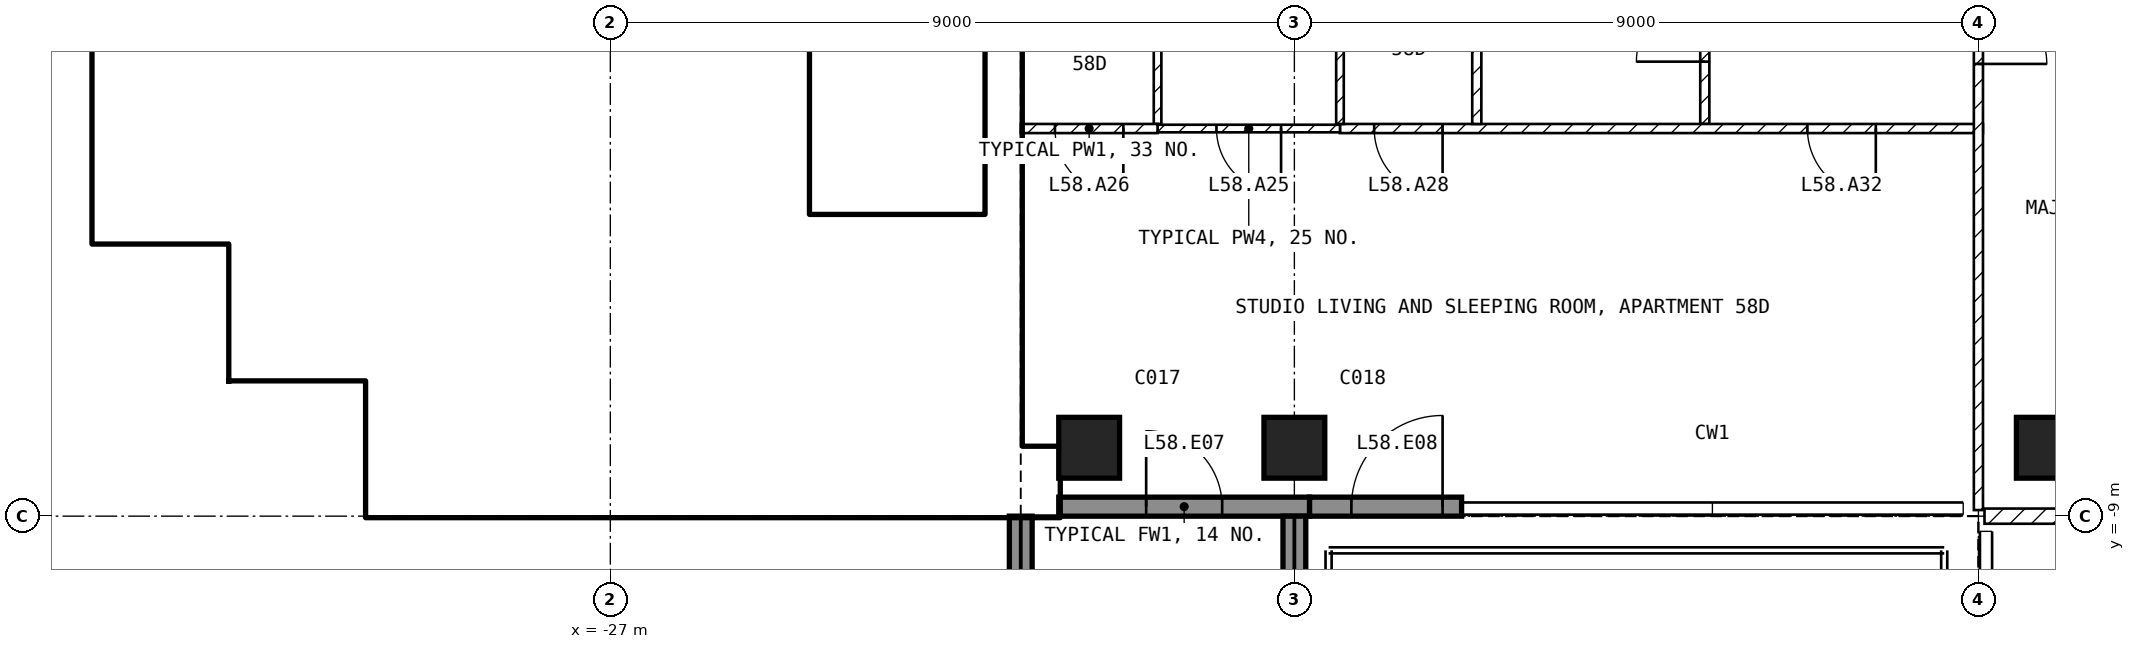
"""IFC4 building model, lengths in metres.
Left out: names, types, materials, properties, quantities, classifications, styles, units other than length and angle.
Written with IfcOpenShell. Run it as: python <this file> out.ifc"""

import sys

from ifc_helpers import new_model, si_unit, direction, frame, frame_2d, origin, origin_2d, place, context, subcontext, project, spatial, rectangle, extrude, element, fill, save


model = new_model("IFC4")
c1 = context("Model", 3, precision=1e-05, world=origin(), true_north=direction((0.0, 1.0)))
c2 = subcontext(c1, "Body", "Model", "MODEL_VIEW")
j1 = project(units=[si_unit("LENGTHUNIT", "METRE"), si_unit("PLANEANGLEUNIT", "RADIAN")], contexts=[c1])
p1 = place(None, origin())
s1 = spatial("IfcSite", under=j1, at=p1, CompositionType="ELEMENT")
p2 = place(p1, origin())
s2 = spatial("IfcBuilding", under=s1, at=p2, CompositionType="ELEMENT")
p3 = place(p2, frame((0.0, 0.0, 232.5)))
s3 = spatial("IfcBuildingStorey", under=s2, at=p3, CompositionType="ELEMENT", Elevation=232.5)
for number, where, z_axis, x_axis in (
    (1, (-20.7, -8.1, -0.25), (0.0, 0.0, 1.0), (1.0, 0.0, 0.0)),
    (2, (-18.0, -8.1, -0.25), (0.0, 0.0, 1.0), (1.0, 0.0, 0.0)),
    (3, (-8.1, -8.1, -0.25), (0.0, 0.0, 1.0), (1.0, 0.0, 0.0)),
):
    element("IfcColumn", number, at=place(p3, frame(where, z_axis=z_axis, x_axis=x_axis)), inside=s3, PredefinedType="COLUMN", context=c2, shape_type="SweptSolid", body=[
        extrude(rectangle(XDim=0.8, YDim=0.8, at=origin_2d()), origin(), (0.0, 0.0, 1.0), 3.5),
    ])
p4 = place(p3, frame((-21.1, -8.875, 0.0), z_axis=(0.0, 0.0, 1.0), x_axis=(1.0, 0.0, 0.0)))
e4 = element("IfcWall", 4, at=p4, inside=s3, PredefinedType="SOLIDWALL", context=c2, shape_type="SweptSolid", body=[
    extrude(rectangle(XDim=3.3, YDim=0.25, at=frame_2d((1.65, 0.0))), origin(), (0.0, 0.0, 1.0), 3.25),
])
p5 = place(p4, frame((1.15, 0.0, 0.0)))
e5 = element("IfcOpeningElement", 5, at=p5, cuts=e4, PredefinedType="OPENING", context=c2, shape_type="SweptSolid", body=[
    extrude(rectangle(XDim=1.0, YDim=2.4, at=frame_2d((0.5, 1.2))), frame((0.0, 0.135, 0.0), z_axis=(0.0, -1.0, 0.0), x_axis=(1.0, 0.0, 0.0)), (0.0, 0.0, 1.0), 0.27),
])
p6 = place(p3, frame((-17.8, -8.875, 0.0), z_axis=(0.0, 0.0, 1.0), x_axis=(1.0, 0.0, 0.0)))
e6 = element("IfcWall", 6, at=p6, inside=s3, PredefinedType="SOLIDWALL", context=c2, shape_type="SweptSolid", body=[
    extrude(rectangle(XDim=2.0, YDim=0.25, at=frame_2d((1.0, 0.0))), origin(), (0.0, 0.0, 1.0), 3.25),
])
p7 = place(p6, frame((0.55, 0.0, 0.0)))
e7 = element("IfcOpeningElement", 7, at=p7, cuts=e6, PredefinedType="OPENING", context=c2, shape_type="SweptSolid", body=[
    extrude(rectangle(XDim=1.2, YDim=2.4, at=frame_2d((0.6, 1.2))), frame((0.0, 0.135, 0.0), z_axis=(0.0, -1.0, 0.0), x_axis=(1.0, 0.0, 0.0)), (0.0, 0.0, 1.0), 0.27),
])
p8 = place(p3, frame((-21.6, -9.0, 0.0), z_axis=(0.0, 0.0, 1.0), x_axis=(0.0, -1.0, 0.0)))
e8 = element("IfcWall", 8, at=p8, inside=s3, PredefinedType="SOLIDWALL", context=c2, shape_type="SweptSolid", body=[
    extrude(rectangle(XDim=2.7, YDim=0.3, at=frame_2d((1.35, 0.0))), origin(), (0.0, 0.0, 1.0), 3.25),
])
p9 = place(p3, frame((-18.0, -9.0, 0.0), z_axis=(0.0, 0.0, 1.0), x_axis=(0.0, -1.0, 0.0)))
e9 = element("IfcWall", 9, at=p9, inside=s3, PredefinedType="SOLIDWALL", context=c2, shape_type="SweptSolid", body=[
    extrude(rectangle(XDim=2.74, YDim=0.3, at=frame_2d((1.37, 0.0))), origin(), (0.0, 0.0, 1.0), 3.25),
])
p10 = place(p3, frame((-30.2, -8.55, 0.0), z_axis=(0.0, 0.0, 1.0), x_axis=(1.0, 0.0, 0.0)))
e10 = element("IfcWall", 10, at=p10, inside=s3, PredefinedType="SHEAR", context=c2, shape_type="SweptSolid", body=[
    extrude(rectangle(XDim=9.1, YDim=0.9, at=frame_2d((4.55, 0.0))), origin(), (0.0, 0.0, 1.0), 3.25),
])
p11 = place(p3, frame((-29.975, -8.1, 0.0), z_axis=(0.0, 0.0, 1.0), x_axis=(0.0, 1.0, 0.0)))
e11 = element("IfcWall", 11, at=p11, inside=s3, PredefinedType="SHEAR", context=c2, shape_type="SweptSolid", body=[
    extrude(rectangle(XDim=1.35, YDim=0.45, at=frame_2d((0.675, 0.0))), origin(), (0.0, 0.0, 1.0), 3.25),
])
for number, where, z_axis, x_axis in (
    (12, (-32.0, -6.975, 0.0), (0.0, 0.0, 1.0), (1.0, 0.0, 0.0)),
    (13, (-31.775, -6.75, 0.0), (0.0, 0.0, 1.0), (0.0, 1.0, 0.0)),
    (14, (-33.8, -5.175, 0.0), (0.0, 0.0, 1.0), (1.0, 0.0, 0.0)),
):
    element("IfcWall", number, at=place(p3, frame(where, z_axis=z_axis, x_axis=x_axis)), inside=s3, PredefinedType="SHEAR", context=c2, shape_type="SweptSolid", body=[
        extrude(rectangle(XDim=1.8, YDim=0.45, at=frame_2d((0.9, 0.0))), origin(), (0.0, 0.0, 1.0), 3.25),
    ])
p12 = place(p3, frame((-33.575, -4.95, 0.0), z_axis=(0.0, 0.0, 1.0), x_axis=(0.0, 1.0, 0.0)))
e15 = element("IfcWall", 15, at=p12, inside=s3, PredefinedType="SHEAR", context=c2, shape_type="SweptSolid", body=[
    extrude(rectangle(XDim=10.35, YDim=0.45, at=frame_2d((5.175, 0.0))), origin(), (0.0, 0.0, 1.0), 3.25),
])
p13 = place(p3, frame((-21.825, -8.1, 0.0), z_axis=(0.0, 0.0, 1.0), x_axis=(0.0, 1.0, 0.0)))
e16 = element("IfcWall", 16, at=p13, inside=s3, PredefinedType="SHEAR", context=c2, shape_type="SweptSolid", body=[
    extrude(rectangle(XDim=6.9, YDim=0.45, at=frame_2d((3.45, 0.0))), origin(), (0.0, 0.0, 1.0), 3.25),
])
p14 = place(p3, frame((-24.5, -5.05, 0.0), z_axis=(0.0, 0.0, 1.0), x_axis=(0.0, 1.0, 0.0)))
e17 = element("IfcWall", 17, at=p14, inside=s3, PredefinedType="SOLIDWALL", context=c2, shape_type="SweptSolid", body=[
    extrude(rectangle(XDim=3.7, YDim=0.2, at=frame_2d((1.85, 0.0))), origin(), (0.0, 0.0, 1.0), 3.25),
])
p15 = place(p14, frame((0.1, 0.0, 0.0)))
e18 = element("IfcOpeningElement", 18, at=p15, cuts=e17, PredefinedType="OPENING", context=c2, shape_type="SweptSolid", body=[
    extrude(rectangle(XDim=0.8, YDim=2.1, at=frame_2d((0.4, 1.05))), frame((0.0, 0.11, 0.0), z_axis=(0.0, -1.0, 0.0), x_axis=(1.0, 0.0, 0.0)), (0.0, 0.0, 1.0), 0.22),
])
p16 = place(p3, frame((-28.35, -5.15, 0.0), z_axis=(0.0, 0.0, 1.0), x_axis=(1.0, 0.0, 0.0)))
e19 = element("IfcWall", 19, at=p16, inside=s3, PredefinedType="SOLIDWALL", context=c2, shape_type="SweptSolid", body=[
    extrude(rectangle(XDim=6.3, YDim=0.2, at=frame_2d((3.15, 0.0))), origin(), (0.0, 0.0, 1.0), 3.25),
])
p17 = place(p16, frame((5.1, 0.0, 0.0)))
e20 = element("IfcOpeningElement", 20, at=p17, cuts=e19, PredefinedType="OPENING", context=c2, shape_type="SweptSolid", body=[
    extrude(rectangle(XDim=1.0, YDim=2.1, at=frame_2d((0.5, 1.05))), frame((0.0, 0.11, 0.0), z_axis=(0.0, -1.0, 0.0), x_axis=(1.0, 0.0, 0.0)), (0.0, 0.0, 1.0), 0.22),
])
p18 = place(p3, frame((-28.25, -8.1, 0.0), z_axis=(0.0, 0.0, 1.0), x_axis=(0.0, 1.0, 0.0)))
e21 = element("IfcWall", 21, at=p18, inside=s3, PredefinedType="SOLIDWALL", context=c2, shape_type="SweptSolid", body=[
    extrude(rectangle(XDim=2.85, YDim=0.2, at=frame_2d((1.425, 0.0))), origin(), (0.0, 0.0, 1.0), 3.25),
])
p19 = place(p3, frame((-33.35, -3.95, 0.0), z_axis=(0.0, 0.0, 1.0), x_axis=(1.0, 0.0, 0.0)))
e22 = element("IfcWall", 22, at=p19, inside=s3, PredefinedType="SOLIDWALL", context=c2, shape_type="SweptSolid", body=[
    extrude(rectangle(XDim=8.75, YDim=0.2, at=frame_2d((4.375, 0.0))), origin(), (0.0, 0.0, 1.0), 3.25),
])
for number, where, z_axis, x_axis in (
    (23, (-26.5, -3.85, 0.0), (0.0, 0.0, 1.0), (0.0, 1.0, 0.0)),
    (24, (-28.5, -3.85, 0.0), (0.0, 0.0, 1.0), (0.0, 1.0, 0.0)),
    (25, (-30.5, -3.85, 0.0), (0.0, 0.0, 1.0), (0.0, 1.0, 0.0)),
):
    element("IfcWall", number, at=place(p3, frame(where, z_axis=z_axis, x_axis=x_axis)), inside=s3, PredefinedType="SOLIDWALL", context=c2, shape_type="SweptSolid", body=[
        extrude(rectangle(XDim=2.3, YDim=0.2, at=frame_2d((1.15, 0.0))), origin(), (0.0, 0.0, 1.0), 3.25),
    ])
p20 = place(p3, frame((8.92, -9.0, 0.0), z_axis=(0.0, 0.0, 1.0), x_axis=(-1.0, 0.0, 0.0)))
e26 = element("IfcWall", 26, at=p20, inside=s3, PredefinedType="PARTITIONING", context=c2, shape_type="SweptSolid", body=[
    extrude(rectangle(XDim=17.84, YDim=0.2, at=frame_2d((8.92, 0.0))), origin(), (0.0, 0.0, 1.0), 3.25),
])
p21 = place(p20, frame((8.42, 0.0, 0.0)))
e27 = element("IfcOpeningElement", 27, at=p21, cuts=e26, PredefinedType="OPENING", context=c2, shape_type="SweptSolid", body=[
    extrude(rectangle(XDim=1.0, YDim=2.1, at=frame_2d((0.5, 1.05))), frame((0.0, 0.11, 0.0), z_axis=(0.0, -1.0, 0.0), x_axis=(1.0, 0.0, 0.0)), (0.0, 0.0, 1.0), 0.22),
])
p22 = place(p3, frame((-12.6, -3.84, 0.0), z_axis=(0.0, 0.0, 1.0), x_axis=(0.0, 1.0, 0.0)))
e28 = element("IfcWall", 28, at=p22, inside=s3, PredefinedType="PARTITIONING", context=c2, shape_type="SweptSolid", body=[
    extrude(rectangle(XDim=2.54, YDim=0.12, at=frame_2d((1.27, 0.0))), origin(), (0.0, 0.0, 1.0), 3.25),
])
p23 = place(p22, frame((0.82, 0.0, 0.0)))
e29 = element("IfcOpeningElement", 29, at=p23, cuts=e28, PredefinedType="OPENING", context=c2, shape_type="SweptSolid", body=[
    extrude(rectangle(XDim=0.9, YDim=2.1, at=frame_2d((0.45, 1.05))), frame((0.0, 0.07, 0.0), z_axis=(0.0, -1.0, 0.0), x_axis=(1.0, 0.0, 0.0)), (0.0, 0.0, 1.0), 0.14),
])
p24 = place(p3, frame((-8.94, -3.9, 0.0), z_axis=(0.0, 0.0, 1.0), x_axis=(-1.0, 0.0, 0.0)))
e30 = element("IfcWall", 30, at=p24, inside=s3, PredefinedType="PARTITIONING", context=c2, shape_type="SweptSolid", body=[
    extrude(rectangle(XDim=8.46, YDim=0.12, at=frame_2d((4.23, 0.0))), origin(), (0.0, 0.0, 1.0), 3.25),
])
p25 = place(p24, frame((7.11, 0.0, 0.0)))
e31 = element("IfcOpeningElement", 31, at=p25, cuts=e30, PredefinedType="OPENING", context=c2, shape_type="SweptSolid", body=[
    extrude(rectangle(XDim=0.9, YDim=2.1, at=frame_2d((0.45, 1.05))), frame((0.0, 0.07, 0.0), z_axis=(0.0, -1.0, 0.0), x_axis=(1.0, 0.0, 0.0)), (0.0, 0.0, 1.0), 0.14),
])
p26 = place(p24, frame((1.41, 0.0, 0.0)))
e32 = element("IfcOpeningElement", 32, at=p26, cuts=e30, PredefinedType="OPENING", context=c2, shape_type="SweptSolid", body=[
    extrude(rectangle(XDim=0.9, YDim=2.1, at=frame_2d((0.45, 1.05))), frame((0.0, 0.07, 0.0), z_axis=(0.0, -1.0, 0.0), x_axis=(1.0, 0.0, 0.0)), (0.0, 0.0, 1.0), 0.14),
])
p27 = place(p3, frame((-9.0, -1.3, 0.0), z_axis=(0.0, 0.0, 1.0), x_axis=(0.0, -1.0, 0.0)))
e33 = element("IfcWall", 33, at=p27, inside=s3, PredefinedType="PARTITIONING", context=c2, shape_type="SweptSolid", body=[
    extrude(rectangle(XDim=7.62, YDim=0.12, at=frame_2d((3.81, 0.0))), origin(), (0.0, 0.0, 1.0), 3.25),
])
p28 = place(p27, frame((0.85, 0.0, 0.0)))
e34 = element("IfcOpeningElement", 34, at=p28, cuts=e33, PredefinedType="OPENING", context=c2, shape_type="SweptSolid", body=[
    extrude(rectangle(XDim=0.9, YDim=2.1, at=frame_2d((0.45, 1.05))), frame((0.0, 0.07, 0.0), z_axis=(0.0, -1.0, 0.0), x_axis=(1.0, 0.0, 0.0)), (0.0, 0.0, 1.0), 0.14),
])
p29 = place(p3, frame((-15.6, -3.84, 0.0), z_axis=(0.0, 0.0, 1.0), x_axis=(0.0, 1.0, 0.0)))
e35 = element("IfcWall", 35, at=p29, inside=s3, PredefinedType="PARTITIONING", context=c2, shape_type="SweptSolid", body=[
    extrude(rectangle(XDim=2.54, YDim=0.12, at=frame_2d((1.27, 0.0))), origin(), (0.0, 0.0, 1.0), 3.25),
])
for number, where, z_axis, x_axis in (
    (36, (-17.4, -3.84, 0.0), (0.0, 0.0, 1.0), (0.0, 1.0, 0.0)),
    (37, (-19.8, -3.84, 0.0), (0.0, 0.0, 1.0), (0.0, 1.0, 0.0)),
):
    element("IfcWall", number, at=place(p3, frame(where, z_axis=z_axis, x_axis=x_axis)), inside=s3, PredefinedType="PARTITIONING", context=c2, shape_type="SweptSolid", body=[
        extrude(rectangle(XDim=2.54, YDim=0.1, at=frame_2d((1.27, 0.0))), origin(), (0.0, 0.0, 1.0), 3.25),
    ])
p30 = place(p3, frame((-17.4, -3.9, 0.0), z_axis=(0.0, 0.0, 1.0), x_axis=(-1.0, 0.0, 0.0)))
e38 = element("IfcWall", 38, at=p30, inside=s3, PredefinedType="PARTITIONING", context=c2, shape_type="SweptSolid", body=[
    extrude(rectangle(XDim=2.4, YDim=0.1, at=frame_2d((1.2, 0.0))), origin(), (0.0, 0.0, 1.0), 3.25),
])
p31 = place(p30, frame((0.775, 0.0, 0.0)))
e39 = element("IfcOpeningElement", 39, at=p31, cuts=e38, PredefinedType="OPENING", context=c2, shape_type="SweptSolid", body=[
    extrude(rectangle(XDim=0.85, YDim=2.1, at=frame_2d((0.425, 1.05))), frame((0.0, 0.06, 0.0), z_axis=(0.0, -1.0, 0.0), x_axis=(1.0, 0.0, 0.0)), (0.0, 0.0, 1.0), 0.12),
])
p32 = place(p3, frame((-19.8, -3.9, 0.0), z_axis=(0.0, 0.0, 1.0), x_axis=(-1.0, 0.0, 0.0)))
e40 = element("IfcWall", 40, at=p32, inside=s3, PredefinedType="PARTITIONING", context=c2, shape_type="SweptSolid", body=[
    extrude(rectangle(XDim=1.8, YDim=0.12, at=frame_2d((0.9, 0.0))), origin(), (0.0, 0.0, 1.0), 3.25),
])
p33 = place(p32, frame((0.45, 0.0, 0.0)))
e41 = element("IfcOpeningElement", 41, at=p33, cuts=e40, PredefinedType="OPENING", context=c2, shape_type="SweptSolid", body=[
    extrude(rectangle(XDim=0.9, YDim=2.1, at=frame_2d((0.45, 1.05))), frame((0.0, 0.07, 0.0), z_axis=(0.0, -1.0, 0.0), x_axis=(1.0, 0.0, 0.0)), (0.0, 0.0, 1.0), 0.14),
])
p34 = place(p5, origin())
e42 = element("IfcDoor", 42, at=p34, inside=s3, OperationType="SINGLE_SWING_LEFT", PredefinedType="DOOR", context=c2, shape_type="SweptSolid", body=[
    extrude(rectangle(XDim=1.0, YDim=2.4, at=frame_2d((0.5, 1.2))), frame((0.0, 0.025, 0.0), z_axis=(0.0, -1.0, 0.0), x_axis=(1.0, 0.0, 0.0)), (0.0, 0.0, 1.0), 0.05),
])
fill(e5, e42)
p35 = place(p7, origin())
e43 = element("IfcDoor", 43, at=p35, inside=s3, OperationType="SINGLE_SWING_RIGHT", PredefinedType="DOOR", context=c2, shape_type="SweptSolid", body=[
    extrude(rectangle(XDim=1.2, YDim=2.4, at=frame_2d((0.6, 1.2))), frame((0.0, 0.025, 0.0), z_axis=(0.0, -1.0, 0.0), x_axis=(1.0, 0.0, 0.0)), (0.0, 0.0, 1.0), 0.05),
])
fill(e7, e43)
p36 = place(p17, origin())
e44 = element("IfcDoor", 44, at=p36, inside=s3, OperationType="SINGLE_SWING_LEFT", PredefinedType="DOOR", context=c2, shape_type="SweptSolid", body=[
    extrude(rectangle(XDim=1.0, YDim=2.1, at=frame_2d((0.5, 1.05))), frame((0.0, 0.025, 0.0), z_axis=(0.0, -1.0, 0.0), x_axis=(1.0, 0.0, 0.0)), (0.0, 0.0, 1.0), 0.05),
])
fill(e20, e44)
p37 = place(p15, origin())
e45 = element("IfcDoor", 45, at=p37, inside=s3, OperationType="SINGLE_SWING_LEFT", PredefinedType="DOOR", context=c2, shape_type="SweptSolid", body=[
    extrude(rectangle(XDim=0.8, YDim=2.1, at=frame_2d((0.4, 1.05))), frame((0.0, 0.025, 0.0), z_axis=(0.0, -1.0, 0.0), x_axis=(1.0, 0.0, 0.0)), (0.0, 0.0, 1.0), 0.05),
])
fill(e18, e45)
p38 = place(p31, origin())
e46 = element("IfcDoor", 46, at=p38, inside=s3, OperationType="SINGLE_SWING_LEFT", PredefinedType="DOOR", context=c2, shape_type="SweptSolid", body=[
    extrude(rectangle(XDim=0.85, YDim=2.1, at=frame_2d((0.425, 1.05))), frame((0.0, 0.025, 0.0), z_axis=(0.0, -1.0, 0.0), x_axis=(1.0, 0.0, 0.0)), (0.0, 0.0, 1.0), 0.05),
])
fill(e39, e46)
p39 = place(p33, origin())
e47 = element("IfcDoor", 47, at=p39, inside=s3, OperationType="SINGLE_SWING_LEFT", PredefinedType="DOOR", context=c2, shape_type="SweptSolid", body=[
    extrude(rectangle(XDim=0.9, YDim=2.1, at=frame_2d((0.45, 1.05))), frame((0.0, 0.025, 0.0), z_axis=(0.0, -1.0, 0.0), x_axis=(1.0, 0.0, 0.0)), (0.0, 0.0, 1.0), 0.05),
])
fill(e41, e47)
p40 = place(p23, origin())
e48 = element("IfcDoor", 48, at=p40, inside=s3, OperationType="SINGLE_SWING_LEFT", PredefinedType="DOOR", context=c2, shape_type="SweptSolid", body=[
    extrude(rectangle(XDim=0.9, YDim=2.1, at=frame_2d((0.45, 1.05))), frame((0.0, 0.025, 0.0), z_axis=(0.0, -1.0, 0.0), x_axis=(1.0, 0.0, 0.0)), (0.0, 0.0, 1.0), 0.05),
])
fill(e29, e48)
p41 = place(p25, origin())
e49 = element("IfcDoor", 49, at=p41, inside=s3, OperationType="SINGLE_SWING_LEFT", PredefinedType="DOOR", context=c2, shape_type="SweptSolid", body=[
    extrude(rectangle(XDim=0.9, YDim=2.1, at=frame_2d((0.45, 1.05))), frame((0.0, 0.025, 0.0), z_axis=(0.0, -1.0, 0.0), x_axis=(1.0, 0.0, 0.0)), (0.0, 0.0, 1.0), 0.05),
])
fill(e31, e49)
p42 = place(p28, origin())
e50 = element("IfcDoor", 50, at=p42, inside=s3, OperationType="SINGLE_SWING_RIGHT", PredefinedType="DOOR", context=c2, shape_type="SweptSolid", body=[
    extrude(rectangle(XDim=0.9, YDim=2.1, at=frame_2d((0.45, 1.05))), frame((0.0, 0.025, 0.0), z_axis=(0.0, -1.0, 0.0), x_axis=(1.0, 0.0, 0.0)), (0.0, 0.0, 1.0), 0.05),
])
fill(e34, e50)
p43 = place(p26, origin())
e51 = element("IfcDoor", 51, at=p43, inside=s3, OperationType="SINGLE_SWING_LEFT", PredefinedType="DOOR", context=c2, shape_type="SweptSolid", body=[
    extrude(rectangle(XDim=0.9, YDim=2.1, at=frame_2d((0.45, 1.05))), frame((0.0, 0.025, 0.0), z_axis=(0.0, -1.0, 0.0), x_axis=(1.0, 0.0, 0.0)), (0.0, 0.0, 1.0), 0.05),
])
fill(e32, e51)
save(model, sys.argv[1])
